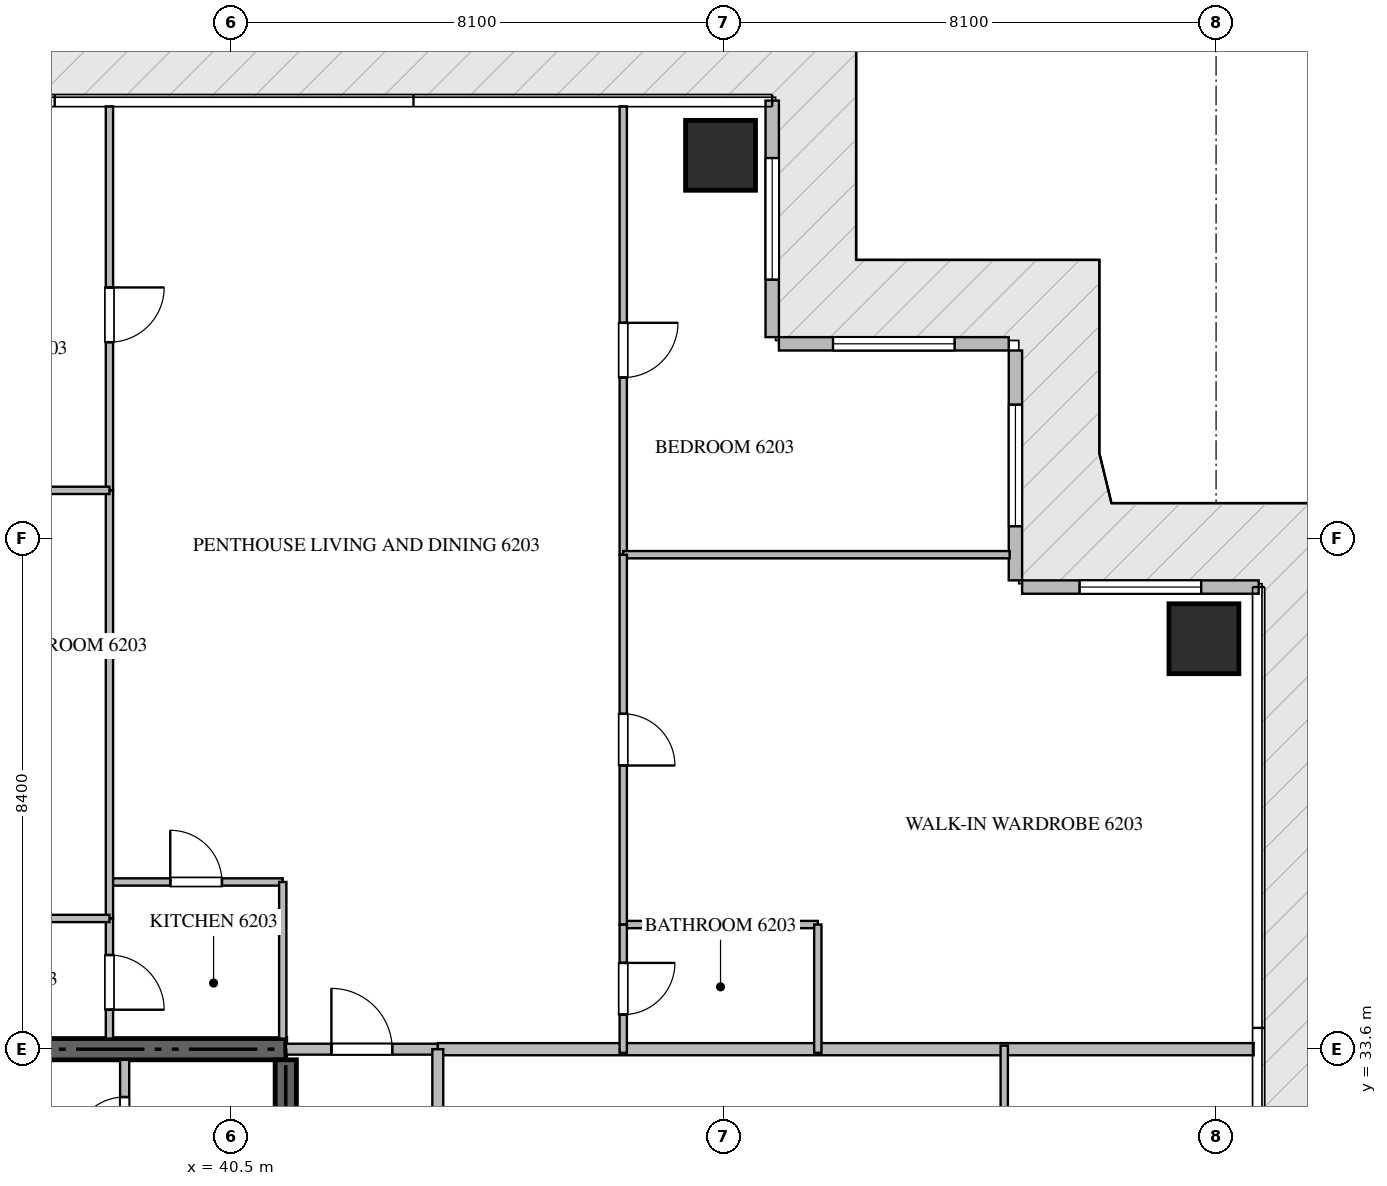
"""IFC4 building model, lengths in metres.
Left out: names, types, materials, properties, quantities, classifications, styles, units other than length and angle.
Written with IfcOpenShell. Run it as: python <this file> out.ifc"""

import sys

from ifc_helpers import new_model, si_unit, direction, frame, frame_2d, origin, origin_2d, place, context, subcontext, project, spatial, rectangle, extrude, source, transform, mapped, element, fill, save


model = new_model("IFC4")
c1 = context("Model", 3, precision=1e-05, world=origin(), true_north=direction((0.0, 1.0)))
c2 = subcontext(c1, "Body", "Model", "MODEL_VIEW")
j1 = project(units=[si_unit("LENGTHUNIT", "METRE"), si_unit("PLANEANGLEUNIT", "RADIAN")], contexts=[c1])
p1 = place(None, origin())
s1 = spatial("IfcSite", under=j1, at=p1, CompositionType="ELEMENT")
p2 = place(p1, origin())
s2 = spatial("IfcBuilding", under=s1, at=p2, CompositionType="ELEMENT")
p3 = place(p2, frame((0.0, 0.0, 248.95)))
s3 = spatial("IfcBuildingStorey", under=s2, at=p3, CompositionType="ELEMENT", Elevation=248.95)
p4 = place(p3, frame((41.4, 33.6, -0.26), z_axis=(0.0, 0.0, 1.0), x_axis=(-1.0, 0.0, 0.0)))
e1 = element("IfcWall", 1, at=p4, inside=s3, PredefinedType="SHEAR", context=c2, shape_type="SweptSolid", body=[
    extrude(rectangle(XDim=18.0, YDim=0.35, at=frame_2d((9.0, 0.0))), origin(), (0.0, 0.0, 1.0), 3.848),
])
p5 = place(p3, frame((41.4, 27.75, -0.26), z_axis=(0.0, 0.0, 1.0), x_axis=(0.0, 1.0, 0.0)))
e2 = element("IfcWall", 2, at=p5, inside=s3, PredefinedType="SHEAR", context=c2, shape_type="SweptSolid", body=[
    extrude(rectangle(XDim=5.675, YDim=0.35, at=frame_2d((2.837, 0.0))), origin(), (0.0, 0.0, 1.0), 3.848),
])
m1 = source(origin(), c2, "Body", "SweptSolid", [
    extrude(rectangle(XDim=1.15, YDim=1.15, at=origin_2d()), origin(), (0.0, 0.0, 1.0), 3.85),
])
for number, where, z_axis, x_axis in (
    (3, (48.55, 48.3, -0.26), (0.0, 0.0, 1.0), (1.0, 0.0, 0.0)),
    (4, (56.5, 40.35, -0.26), (0.0, 0.0, 1.0), (1.0, 0.0, 0.0)),
):
    element("IfcColumn", number, at=place(p3, frame(where, z_axis=z_axis, x_axis=x_axis)), inside=s3, PredefinedType="COLUMN", context=c2, shape_type="MappedRepresentation", body=[
        mapped(m1, transform((0.0, 0.0, 0.0), scale=1.0)),
    ])
p6 = place(p3, frame((57.4, 41.2, 0.0), z_axis=(0.0, 0.0, 1.0), x_axis=(-1.0, 0.0, 0.0)))
e5 = element("IfcWall", 5, at=p6, inside=s3, PredefinedType="ELEMENTEDWALL", context=c2, shape_type="SweptSolid", body=[
    extrude(rectangle(XDim=3.89, YDim=0.22, at=frame_2d((1.945, 0.0))), origin(), (0.0, 0.0, 1.0), 3.575),
])
p7 = place(p6, frame((0.945, 0.0, 0.65)))
e6 = element("IfcOpeningElement", 6, at=p7, cuts=e5, PredefinedType="OPENING", context=c2, shape_type="SweptSolid", body=[
    extrude(rectangle(XDim=2.0, YDim=2.2, at=frame_2d((1.0, 1.1))), frame((0.0, 0.12, 0.0), z_axis=(0.0, -1.0, 0.0), x_axis=(1.0, 0.0, 0.0)), (0.0, 0.0, 1.0), 0.24),
])
p8 = place(p3, frame((53.4, 41.31, 0.0), z_axis=(0.0, 0.0, 1.0), x_axis=(0.0, 1.0, 0.0)))
e7 = element("IfcWall", 7, at=p8, inside=s3, PredefinedType="ELEMENTEDWALL", context=c2, shape_type="SweptSolid", body=[
    extrude(rectangle(XDim=3.78, YDim=0.22, at=frame_2d((1.89, 0.0))), origin(), (0.0, 0.0, 1.0), 3.575),
])
p9 = place(p8, frame((0.89, 0.0, 0.65)))
e8 = element("IfcOpeningElement", 8, at=p9, cuts=e7, PredefinedType="OPENING", context=c2, shape_type="SweptSolid", body=[
    extrude(rectangle(XDim=2.0, YDim=2.2, at=frame_2d((1.0, 1.1))), frame((0.0, 0.12, 0.0), z_axis=(0.0, -1.0, 0.0), x_axis=(1.0, 0.0, 0.0)), (0.0, 0.0, 1.0), 0.24),
])
p10 = place(p3, frame((53.29, 45.2, 0.0), z_axis=(0.0, 0.0, 1.0), x_axis=(-1.0, 0.0, 0.0)))
e9 = element("IfcWall", 9, at=p10, inside=s3, PredefinedType="ELEMENTEDWALL", context=c2, shape_type="SweptSolid", body=[
    extrude(rectangle(XDim=3.78, YDim=0.22, at=frame_2d((1.89, 0.0))), origin(), (0.0, 0.0, 1.0), 3.575),
])
p11 = place(p10, frame((0.89, 0.0, 0.65)))
e10 = element("IfcOpeningElement", 10, at=p11, cuts=e9, PredefinedType="OPENING", context=c2, shape_type="SweptSolid", body=[
    extrude(rectangle(XDim=2.0, YDim=2.2, at=frame_2d((1.0, 1.1))), frame((0.0, 0.12, 0.0), z_axis=(0.0, -1.0, 0.0), x_axis=(1.0, 0.0, 0.0)), (0.0, 0.0, 1.0), 0.24),
])
p12 = place(p3, frame((49.4, 45.31, 0.0), z_axis=(0.0, 0.0, 1.0), x_axis=(0.0, 1.0, 0.0)))
e11 = element("IfcWall", 11, at=p12, inside=s3, PredefinedType="ELEMENTEDWALL", context=c2, shape_type="SweptSolid", body=[
    extrude(rectangle(XDim=3.89, YDim=0.22, at=frame_2d((1.945, 0.0))), origin(), (0.0, 0.0, 1.0), 3.575),
])
p13 = place(p12, frame((0.945, 0.0, 0.65)))
e12 = element("IfcOpeningElement", 12, at=p13, cuts=e11, PredefinedType="OPENING", context=c2, shape_type="SweptSolid", body=[
    extrude(rectangle(XDim=2.0, YDim=2.2, at=frame_2d((1.0, 1.1))), frame((0.0, 0.12, 0.0), z_axis=(0.0, -1.0, 0.0), x_axis=(1.0, 0.0, 0.0)), (0.0, 0.0, 1.0), 0.24),
])
p14 = place(p3, frame((38.75, 31.352, 0.0), z_axis=(0.0, 0.0, 1.0), x_axis=(0.0, 1.0, 0.0)))
e13 = element("IfcWall", 13, at=p14, inside=s3, PredefinedType="PARTITIONING", context=c2, shape_type="SweptSolid", body=[
    extrude(rectangle(XDim=2.073, YDim=0.15, at=frame_2d((1.037, 0.0))), origin(), (0.0, 0.0, 1.0), 3.59),
])
p15 = place(p14, frame((0.611, 0.0, 0.0)))
e14 = element("IfcOpeningElement", 14, at=p15, cuts=e13, PredefinedType="OPENING", context=c2, shape_type="SweptSolid", body=[
    extrude(rectangle(XDim=0.85, YDim=2.1, at=frame_2d((0.425, 1.05))), frame((0.0, 0.085, 0.0), z_axis=(0.0, -1.0, 0.0), x_axis=(1.0, 0.0, 0.0)), (0.0, 0.0, 1.0), 0.17),
])
p16 = place(p3, frame((43.9, 33.6, 0.0), z_axis=(0.0, 0.0, 1.0), x_axis=(1.0, 0.0, 0.0)))
e15 = element("IfcWall", 15, at=p16, inside=s3, PredefinedType="PARTITIONING", context=c2, shape_type="SweptSolid", body=[
    extrude(rectangle(XDim=13.418, YDim=0.2, at=frame_2d((6.709, 0.0))), origin(), (0.0, 0.0, 1.0), 3.59),
])
p17 = place(p3, frame((41.402, 33.6, 0.0), z_axis=(0.0, 0.0, 1.0), x_axis=(1.0, 0.0, 0.0)))
e16 = element("IfcWall", 16, at=p17, inside=s3, PredefinedType="PARTITIONING", context=c2, shape_type="SweptSolid", body=[
    extrude(rectangle(XDim=2.496, YDim=0.18, at=frame_2d((1.248, 0.0))), origin(), (0.0, 0.0, 1.0), 3.59),
])
p18 = place(p17, frame((0.748, 0.0, 0.0)))
e17 = element("IfcOpeningElement", 17, at=p18, cuts=e16, PredefinedType="OPENING", context=c2, shape_type="SweptSolid", body=[
    extrude(rectangle(XDim=1.0, YDim=2.15, at=frame_2d((0.5, 1.075))), frame((0.0, 0.1, 0.0), z_axis=(0.0, -1.0, 0.0), x_axis=(1.0, 0.0, 0.0)), (0.0, 0.0, 1.0), 0.2),
])
p19 = place(p3, frame((43.9, 16.8, 0.0), z_axis=(0.0, 0.0, 1.0), x_axis=(0.0, 1.0, 0.0)))
e18 = element("IfcWall", 18, at=p19, inside=s3, PredefinedType="PARTITIONING", context=c2, shape_type="SweptSolid", body=[
    extrude(rectangle(XDim=16.8, YDim=0.18, at=frame_2d((8.4, 0.0))), origin(), (0.0, 0.0, 1.0), 3.59),
])
p20 = place(p19, frame((1.3, 0.0, 0.0)))
e19 = element("IfcOpeningElement", 19, at=p20, cuts=e18, PredefinedType="OPENING", context=c2, shape_type="SweptSolid", body=[
    extrude(rectangle(XDim=1.0, YDim=2.15, at=frame_2d((0.5, 1.075))), frame((0.0, 0.1, 0.0), z_axis=(0.0, -1.0, 0.0), x_axis=(1.0, 0.0, 0.0)), (0.0, 0.0, 1.0), 0.2),
])
p21 = place(p3, frame((38.5, 36.35, 0.0), z_axis=(0.0, 0.0, 1.0), x_axis=(1.0, 0.0, 0.0)))
e20 = element("IfcWall", 20, at=p21, inside=s3, PredefinedType="PARTITIONING", context=c2, shape_type="SweptSolid", body=[
    extrude(rectangle(XDim=2.85, YDim=0.12, at=frame_2d((1.425, 0.0))), origin(), (0.0, 0.0, 1.0), 3.59),
])
p22 = place(p21, frame((1.0, 0.0, 0.0)))
e21 = element("IfcOpeningElement", 21, at=p22, cuts=e20, PredefinedType="OPENING", context=c2, shape_type="SweptSolid", body=[
    extrude(rectangle(XDim=0.85, YDim=2.1, at=frame_2d((0.425, 1.05))), frame((0.0, 0.07, 0.0), z_axis=(0.0, -1.0, 0.0), x_axis=(1.0, 0.0, 0.0)), (0.0, 0.0, 1.0), 0.14),
])
p23 = place(p3, frame((41.35, 36.35, 0.0), z_axis=(0.0, 0.0, 1.0), x_axis=(0.0, -1.0, 0.0)))
e22 = element("IfcWall", 22, at=p23, inside=s3, PredefinedType="PARTITIONING", context=c2, shape_type="SweptSolid", body=[
    extrude(rectangle(XDim=2.575, YDim=0.12, at=frame_2d((1.288, 0.0))), origin(), (0.0, 0.0, 1.0), 3.59),
])
p24 = place(p3, frame((38.5, 35.75, 0.0), z_axis=(0.0, 0.0, 1.0), x_axis=(0.0, -1.0, 0.0)))
e23 = element("IfcWall", 23, at=p24, inside=s3, PredefinedType="PARTITIONING", context=c2, shape_type="SweptSolid", body=[
    extrude(rectangle(XDim=1.975, YDim=0.12, at=frame_2d((0.988, 0.0))), origin(), (0.0, 0.0, 1.0), 3.59),
])
p25 = place(p24, frame((0.601, 0.0, 0.0)))
e24 = element("IfcOpeningElement", 24, at=p25, cuts=e23, PredefinedType="OPENING", context=c2, shape_type="SweptSolid", body=[
    extrude(rectangle(XDim=0.9, YDim=2.1, at=frame_2d((0.45, 1.05))), frame((0.0, 0.07, 0.0), z_axis=(0.0, -1.0, 0.0), x_axis=(1.0, 0.0, 0.0)), (0.0, 0.0, 1.0), 0.14),
])
p26 = place(p3, frame((38.5, 49.105, 0.0), z_axis=(0.0, 0.0, 1.0), x_axis=(0.0, -1.0, 0.0)))
e25 = element("IfcWall", 25, at=p26, inside=s3, PredefinedType="PARTITIONING", context=c2, shape_type="SweptSolid", body=[
    extrude(rectangle(XDim=6.315, YDim=0.12, at=frame_2d((3.157, 0.0))), origin(), (0.0, 0.0, 1.0), 3.59),
])
p27 = place(p26, frame((2.978, 0.0, 0.0)))
e26 = element("IfcOpeningElement", 26, at=p27, cuts=e25, PredefinedType="OPENING", context=c2, shape_type="SweptSolid", body=[
    extrude(rectangle(XDim=0.9, YDim=2.1, at=frame_2d((0.45, 1.05))), frame((0.0, 0.07, 0.0), z_axis=(0.0, -1.0, 0.0), x_axis=(1.0, 0.0, 0.0)), (0.0, 0.0, 1.0), 0.14),
])
p28 = place(p3, frame((38.5, 42.788, 0.0), z_axis=(0.0, 0.0, 1.0), x_axis=(0.0, -1.0, 0.0)))
e27 = element("IfcWall", 27, at=p28, inside=s3, PredefinedType="PARTITIONING", context=c2, shape_type="SweptSolid", body=[
    extrude(rectangle(XDim=7.036, YDim=0.12, at=frame_2d((3.518, 0.0))), origin(), (0.0, 0.0, 1.0), 3.59),
])
p29 = place(p3, frame((33.38, 42.79, 0.0), z_axis=(0.0, 0.0, 1.0), x_axis=(1.0, 0.0, 0.0)))
e28 = element("IfcWall", 28, at=p29, inside=s3, PredefinedType="PARTITIONING", context=c2, shape_type="SweptSolid", body=[
    extrude(rectangle(XDim=5.12, YDim=0.12, at=frame_2d((2.56, 0.0))), origin(), (0.0, 0.0, 1.0), 3.59),
])
p30 = place(p3, frame((35.482, 35.75, 0.0), z_axis=(0.0, 0.0, 1.0), x_axis=(1.0, 0.0, 0.0)))
e29 = element("IfcWall", 29, at=p30, inside=s3, PredefinedType="PARTITIONING", context=c2, shape_type="SweptSolid", body=[
    extrude(rectangle(XDim=3.018, YDim=0.12, at=frame_2d((1.509, 0.0))), origin(), (0.0, 0.0, 1.0), 3.59),
])
p31 = place(p30, frame((1.084, 0.0, 0.0)))
e30 = element("IfcOpeningElement", 30, at=p31, cuts=e29, PredefinedType="OPENING", context=c2, shape_type="SweptSolid", body=[
    extrude(rectangle(XDim=0.85, YDim=2.1, at=frame_2d((0.425, 1.05))), frame((0.0, 0.07, 0.0), z_axis=(0.0, -1.0, 0.0), x_axis=(1.0, 0.0, 0.0)), (0.0, 0.0, 1.0), 0.14),
])
p32 = place(p3, frame((46.95, 49.105, 0.0), z_axis=(0.0, 0.0, 1.0), x_axis=(0.0, -1.0, 0.0)))
e31 = element("IfcWall", 31, at=p32, inside=s3, PredefinedType="PARTITIONING", context=c2, shape_type="SweptSolid", body=[
    extrude(rectangle(XDim=7.373, YDim=0.12, at=frame_2d((3.687, 0.0))), origin(), (0.0, 0.0, 1.0), 3.59),
])
p33 = place(p32, frame((3.56, 0.0, 0.0)))
e32 = element("IfcOpeningElement", 32, at=p33, cuts=e31, PredefinedType="OPENING", context=c2, shape_type="SweptSolid", body=[
    extrude(rectangle(XDim=0.9, YDim=2.1, at=frame_2d((0.45, 1.05))), frame((0.0, 0.07, 0.0), z_axis=(0.0, -1.0, 0.0), x_axis=(1.0, 0.0, 0.0)), (0.0, 0.0, 1.0), 0.14),
])
p34 = place(p3, frame((46.95, 41.732, 0.0), z_axis=(0.0, 0.0, 1.0), x_axis=(1.0, 0.0, 0.0)))
e33 = element("IfcWall", 33, at=p34, inside=s3, PredefinedType="PARTITIONING", context=c2, shape_type="SweptSolid", body=[
    extrude(rectangle(XDim=6.355, YDim=0.12, at=frame_2d((3.177, 0.0))), origin(), (0.0, 0.0, 1.0), 3.59),
])
p35 = place(p3, frame((46.95, 35.65, 0.0), z_axis=(0.0, 0.0, 1.0), x_axis=(1.0, 0.0, 0.0)))
e34 = element("IfcWall", 34, at=p35, inside=s3, PredefinedType="PARTITIONING", context=c2, shape_type="SweptSolid", body=[
    extrude(rectangle(XDim=3.2, YDim=0.12, at=frame_2d((1.6, 0.0))), origin(), (0.0, 0.0, 1.0), 3.59),
])
p36 = place(p3, frame((50.15, 35.65, 0.0), z_axis=(0.0, 0.0, 1.0), x_axis=(0.0, -1.0, 0.0)))
e35 = element("IfcWall", 35, at=p36, inside=s3, PredefinedType="PARTITIONING", context=c2, shape_type="SweptSolid", body=[
    extrude(rectangle(XDim=2.11, YDim=0.12, at=frame_2d((1.055, 0.0))), origin(), (0.0, 0.0, 1.0), 3.59),
])
p37 = place(p3, frame((46.95, 41.73, 0.0), z_axis=(0.0, 0.0, 1.0), x_axis=(0.0, -1.0, 0.0)))
e36 = element("IfcWall", 36, at=p37, inside=s3, PredefinedType="PARTITIONING", context=c2, shape_type="SweptSolid", body=[
    extrude(rectangle(XDim=6.08, YDim=0.12, at=frame_2d((3.04, 0.0))), origin(), (0.0, 0.0, 1.0), 3.59),
])
p38 = place(p37, frame((2.615, 0.0, 0.0)))
e37 = element("IfcOpeningElement", 37, at=p38, cuts=e36, PredefinedType="OPENING", context=c2, shape_type="SweptSolid", body=[
    extrude(rectangle(XDim=0.85, YDim=2.1, at=frame_2d((0.425, 1.05))), frame((0.0, 0.07, 0.0), z_axis=(0.0, -1.0, 0.0), x_axis=(1.0, 0.0, 0.0)), (0.0, 0.0, 1.0), 0.14),
])
p39 = place(p3, frame((46.95, 35.648, 0.0), z_axis=(0.0, 0.0, 1.0), x_axis=(0.0, -1.0, 0.0)))
e38 = element("IfcWall", 38, at=p39, inside=s3, PredefinedType="PARTITIONING", context=c2, shape_type="SweptSolid", body=[
    extrude(rectangle(XDim=2.108, YDim=0.12, at=frame_2d((1.054, 0.0))), origin(), (0.0, 0.0, 1.0), 3.59),
])
p40 = place(p39, frame((0.629, 0.0, 0.0)))
e39 = element("IfcOpeningElement", 39, at=p40, cuts=e38, PredefinedType="OPENING", context=c2, shape_type="SweptSolid", body=[
    extrude(rectangle(XDim=0.85, YDim=2.1, at=frame_2d((0.425, 1.05))), frame((0.0, 0.07, 0.0), z_axis=(0.0, -1.0, 0.0), x_axis=(1.0, 0.0, 0.0)), (0.0, 0.0, 1.0), 0.14),
])
p41 = place(p3, frame((53.216, 23.18, 0.0), z_axis=(0.0, 0.0, 1.0), x_axis=(0.0, 1.0, 0.0)))
e40 = element("IfcWall", 40, at=p41, inside=s3, PredefinedType="PARTITIONING", context=c2, shape_type="SweptSolid", body=[
    extrude(rectangle(XDim=10.48, YDim=0.12, at=frame_2d((5.24, 0.0))), origin(), (0.0, 0.0, 1.0), 3.59),
])
m2 = source(origin(), c2, "Body", "SweptSolid", [
    extrude(rectangle(XDim=2.0, YDim=2.2, at=frame_2d((1.0, 1.1))), frame((0.0, 0.03, 0.0), z_axis=(0.0, -1.0, 0.0), x_axis=(1.0, 0.0, 0.0)), (0.0, 0.0, 1.0), 0.06),
])
p42 = place(p7, origin())
e41 = element("IfcWindow", 41, at=p42, inside=s3, PartitioningType="SINGLE_PANEL", PredefinedType="WINDOW", context=c2, shape_type="MappedRepresentation", body=[
    mapped(m2, transform((0.0, 0.0, 0.0), scale=1.0)),
])
fill(e6, e41)
p43 = place(p9, origin())
e42 = element("IfcWindow", 42, at=p43, inside=s3, PartitioningType="SINGLE_PANEL", PredefinedType="WINDOW", context=c2, shape_type="MappedRepresentation", body=[
    mapped(m2, transform((0.0, 0.0, 0.0), scale=1.0)),
])
fill(e8, e42)
p44 = place(p11, origin())
e43 = element("IfcWindow", 43, at=p44, inside=s3, PartitioningType="SINGLE_PANEL", PredefinedType="WINDOW", context=c2, shape_type="MappedRepresentation", body=[
    mapped(m2, transform((0.0, 0.0, 0.0), scale=1.0)),
])
fill(e10, e43)
p45 = place(p13, origin())
e44 = element("IfcWindow", 44, at=p45, inside=s3, PartitioningType="SINGLE_PANEL", PredefinedType="WINDOW", context=c2, shape_type="MappedRepresentation", body=[
    mapped(m2, transform((0.0, 0.0, 0.0), scale=1.0)),
])
fill(e12, e44)
m3 = source(origin(), c2, "Body", "SweptSolid", [
    extrude(rectangle(XDim=0.85, YDim=2.1, at=frame_2d((0.425, 1.05))), frame((0.0, 0.025, 0.0), z_axis=(0.0, -1.0, 0.0), x_axis=(1.0, 0.0, 0.0)), (0.0, 0.0, 1.0), 0.05),
])
p46 = place(p15, origin())
e45 = element("IfcDoor", 45, at=p46, inside=s3, OperationType="SINGLE_SWING_LEFT", PredefinedType="DOOR", context=c2, shape_type="MappedRepresentation", body=[
    mapped(m3, transform((0.0, 0.0, 0.0), scale=1.0)),
])
fill(e14, e45)
m4 = source(origin(), c2, "Body", "SweptSolid", [
    extrude(rectangle(XDim=1.0, YDim=2.15, at=frame_2d((0.5, 1.075))), frame((0.0, 0.025, 0.0), z_axis=(0.0, -1.0, 0.0), x_axis=(1.0, 0.0, 0.0)), (0.0, 0.0, 1.0), 0.05),
])
p47 = place(p18, origin())
e46 = element("IfcDoor", 46, at=p47, inside=s3, OperationType="SINGLE_SWING_LEFT", PredefinedType="DOOR", context=c2, shape_type="MappedRepresentation", body=[
    mapped(m4, transform((0.0, 0.0, 0.0), scale=1.0)),
])
fill(e17, e46)
p48 = place(p22, origin())
e47 = element("IfcDoor", 47, at=p48, inside=s3, OperationType="SINGLE_SWING_LEFT", PredefinedType="DOOR", context=c2, shape_type="MappedRepresentation", body=[
    mapped(m3, transform((0.0, 0.0, 0.0), scale=1.0)),
])
fill(e21, e47)
m5 = source(origin(), c2, "Body", "SweptSolid", [
    extrude(rectangle(XDim=0.9, YDim=2.1, at=frame_2d((0.45, 1.05))), frame((0.0, 0.025, 0.0), z_axis=(0.0, -1.0, 0.0), x_axis=(1.0, 0.0, 0.0)), (0.0, 0.0, 1.0), 0.05),
])
p49 = place(p25, origin())
e48 = element("IfcDoor", 48, at=p49, inside=s3, OperationType="SINGLE_SWING_RIGHT", PredefinedType="DOOR", context=c2, shape_type="MappedRepresentation", body=[
    mapped(m5, transform((0.0, 0.0, 0.0), scale=1.0)),
])
fill(e24, e48)
p50 = place(p27, origin())
e49 = element("IfcDoor", 49, at=p50, inside=s3, OperationType="SINGLE_SWING_LEFT", PredefinedType="DOOR", context=c2, shape_type="MappedRepresentation", body=[
    mapped(m5, transform((0.0, 0.0, 0.0), scale=1.0)),
])
fill(e26, e49)
p51 = place(p33, origin())
e50 = element("IfcDoor", 50, at=p51, inside=s3, OperationType="SINGLE_SWING_LEFT", PredefinedType="DOOR", context=c2, shape_type="MappedRepresentation", body=[
    mapped(m5, transform((0.0, 0.0, 0.0), scale=1.0)),
])
fill(e32, e50)
p52 = place(p38, origin())
e51 = element("IfcDoor", 51, at=p52, inside=s3, OperationType="SINGLE_SWING_RIGHT", PredefinedType="DOOR", context=c2, shape_type="MappedRepresentation", body=[
    mapped(m3, transform((0.0, 0.0, 0.0), scale=1.0)),
])
fill(e37, e51)
p53 = place(p40, origin())
e52 = element("IfcDoor", 52, at=p53, inside=s3, OperationType="SINGLE_SWING_LEFT", PredefinedType="DOOR", context=c2, shape_type="MappedRepresentation", body=[
    mapped(m3, transform((0.0, 0.0, 0.0), scale=1.0)),
])
fill(e39, e52)
save(model, sys.argv[1])
